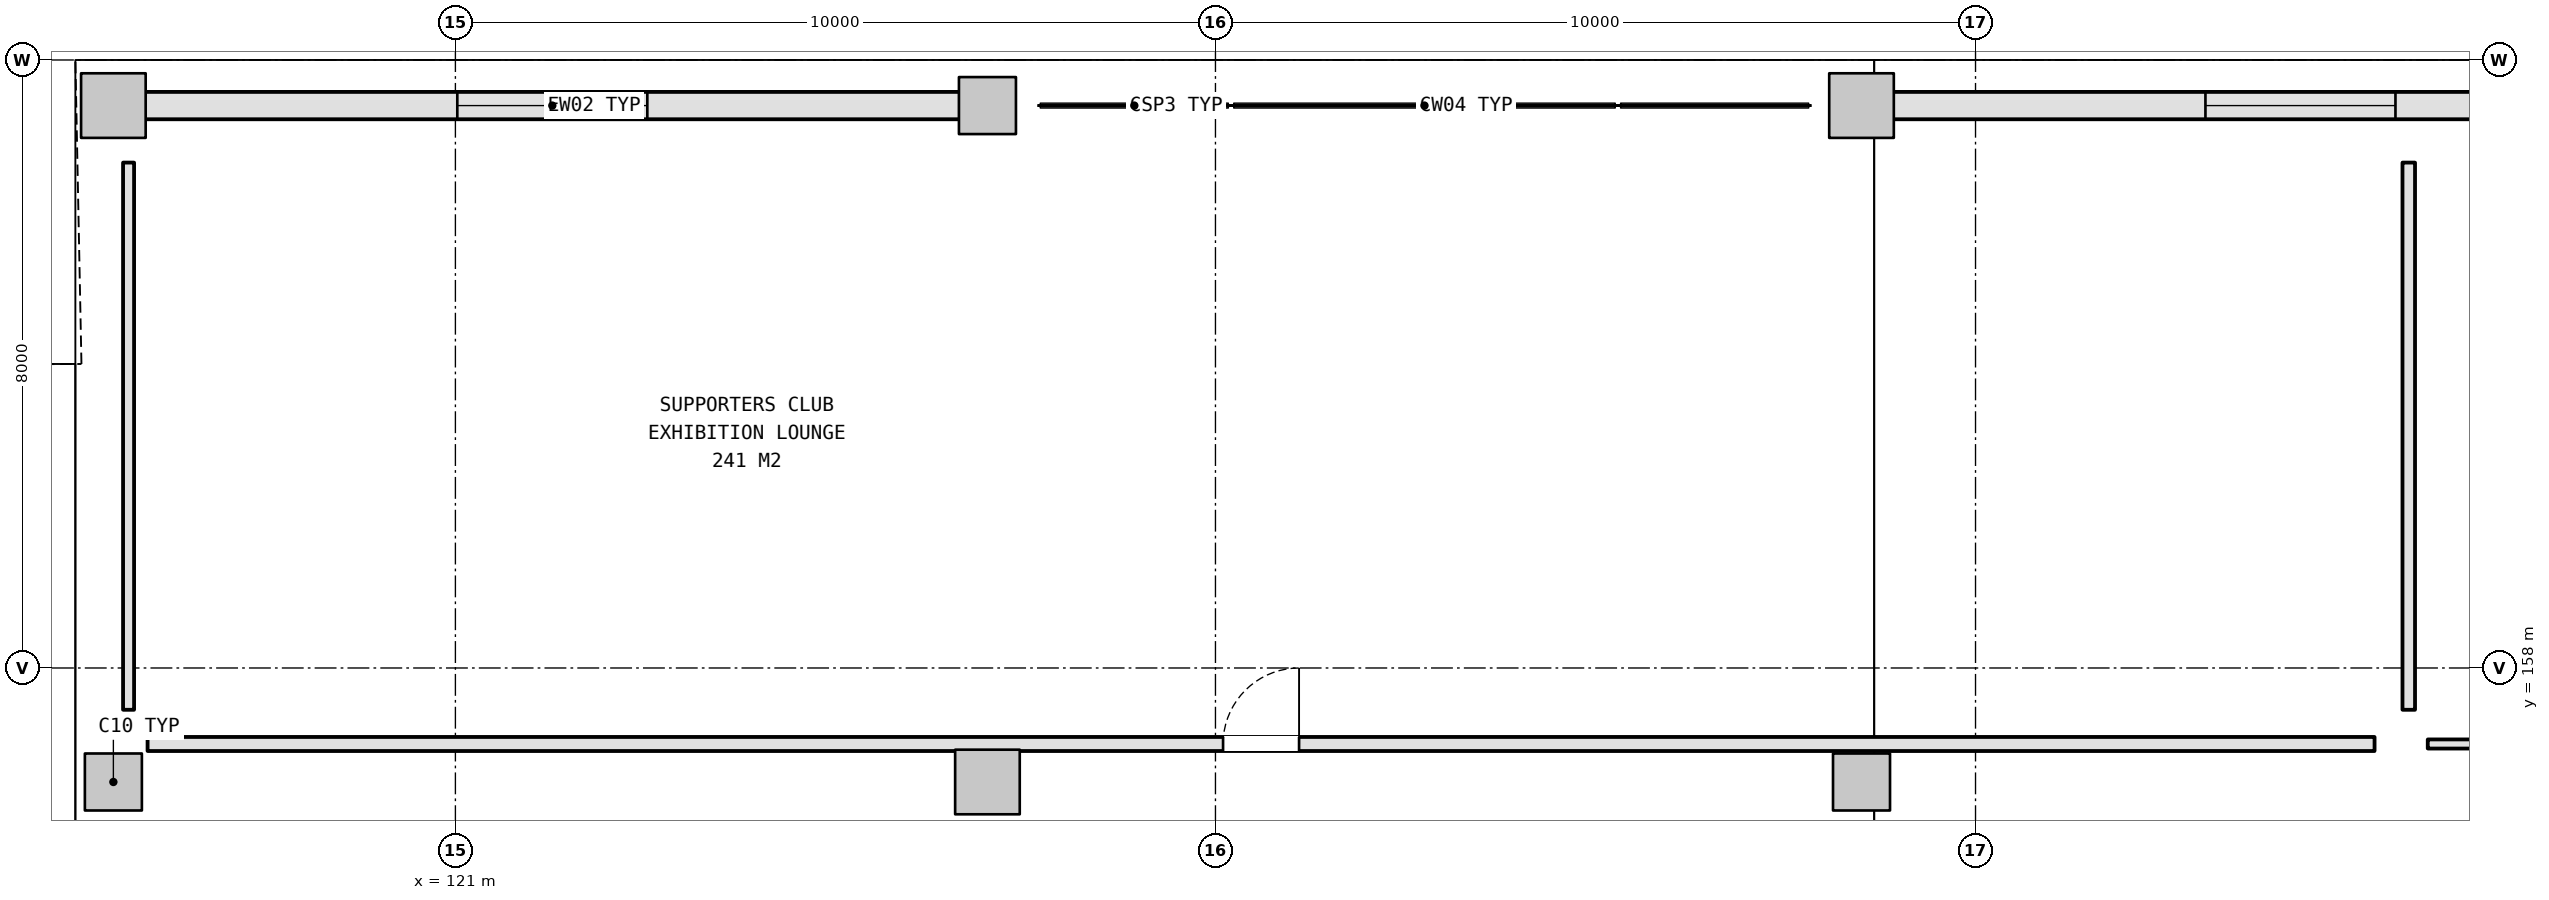
"""IFC4 building model, lengths in metres.
Left out: names, types, materials, properties, quantities, classifications, styles, units other than length and angle.
Written with IfcOpenShell. Run it as: python <this file> out.ifc"""

import sys

from ifc_helpers import new_model, si_unit, direction, frame, frame_2d, origin, origin_2d, place, context, subcontext, project, spatial, rectangle, extrude, element, fill, save


model = new_model("IFC4")
c1 = context("Model", 3, precision=1e-05, world=origin(), true_north=direction((0.0, 1.0)))
c2 = subcontext(c1, "Body", "Model", "MODEL_VIEW")
j1 = project(units=[si_unit("LENGTHUNIT", "METRE"), si_unit("PLANEANGLEUNIT", "RADIAN")], contexts=[c1])
p1 = place(None, origin())
s1 = spatial("IfcSite", under=j1, at=p1, CompositionType="ELEMENT")
p2 = place(p1, origin())
s2 = spatial("IfcBuilding", under=s1, at=p2, CompositionType="ELEMENT")
p3 = place(p2, frame((0.0, 0.0, 5.4)))
s3 = spatial("IfcBuildingStorey", under=s2, at=p3, CompositionType="ELEMENT", Elevation=5.4)
p4 = place(p3, frame((116.5, 156.5, 0.0), z_axis=(0.0, 0.0, 1.0), x_axis=(1.0, 0.0, 0.0)))
e1 = element("IfcColumn", 1, at=p4, inside=s3, PredefinedType="COLUMN", context=c2, shape_type="SweptSolid", body=[
    extrude(rectangle(XDim=0.75, YDim=0.75, at=origin_2d()), origin(), (0.0, 0.0, 1.0), 5.4),
])
for number, where, z_axis, x_axis in (
    (2, (116.5, 165.4, 0.0), (0.0, 0.0, 1.0), (1.0, 0.0, 0.0)),
    (3, (128.0, 156.5, 0.0), (0.0, 0.0, 1.0), (1.0, 0.0, 0.0)),
):
    element("IfcColumn", number, at=place(p3, frame(where, z_axis=z_axis, x_axis=x_axis)), inside=s3, PredefinedType="COLUMN", context=c2, shape_type="SweptSolid", body=[
        extrude(rectangle(XDim=0.85, YDim=0.85, at=origin_2d()), origin(), (0.0, 0.0, 1.0), 5.4),
    ])
for number, where, z_axis, x_axis in (
    (4, (128.0, 165.4, 0.0), (0.0, 0.0, 1.0), (1.0, 0.0, 0.0)),
    (5, (139.5, 156.5, 0.0), (0.0, 0.0, 1.0), (1.0, 0.0, 0.0)),
):
    element("IfcColumn", number, at=place(p3, frame(where, z_axis=z_axis, x_axis=x_axis)), inside=s3, PredefinedType="COLUMN", context=c2, shape_type="SweptSolid", body=[
        extrude(rectangle(XDim=0.75, YDim=0.75, at=origin_2d()), origin(), (0.0, 0.0, 1.0), 5.4),
    ])
p5 = place(p3, frame((139.5, 165.4, 0.0), z_axis=(0.0, 0.0, 1.0), x_axis=(1.0, 0.0, 0.0)))
e6 = element("IfcColumn", 6, at=p5, inside=s3, PredefinedType="COLUMN", context=c2, shape_type="SweptSolid", body=[
    extrude(rectangle(XDim=0.85, YDim=0.85, at=origin_2d()), origin(), (0.0, 0.0, 1.0), 5.4),
])
p6 = place(p3, frame((116.913, 165.4, 0.0), z_axis=(0.0, 0.0, 1.0), x_axis=(1.0, 0.0, 0.0)))
e7 = element("IfcWall", 7, at=p6, inside=s3, PredefinedType="SOLIDWALL", context=c2, shape_type="SweptSolid", body=[
    extrude(rectangle(XDim=10.724, YDim=0.36, at=frame_2d((5.362, 0.0))), origin(), (0.0, 0.0, 1.0), 4.475),
])
p7 = place(p6, frame((4.112, 0.0, 1.05)))
e8 = element("IfcOpeningElement", 8, at=p7, cuts=e7, PredefinedType="OPENING", context=c2, shape_type="SweptSolid", body=[
    extrude(rectangle(XDim=2.5, YDim=2.0, at=frame_2d((1.25, 1.0))), frame((0.0, 0.19, 0.0), z_axis=(0.0, -1.0, 0.0), x_axis=(1.0, 0.0, 0.0)), (0.0, 0.0, 1.0), 0.38),
])
p8 = place(p3, frame((139.913, 165.4, 0.0), z_axis=(0.0, 0.0, 1.0), x_axis=(1.0, 0.0, 0.0)))
e9 = element("IfcWall", 9, at=p8, inside=s3, PredefinedType="SOLIDWALL", context=c2, shape_type="SweptSolid", body=[
    extrude(rectangle(XDim=10.724, YDim=0.36, at=frame_2d((5.362, 0.0))), origin(), (0.0, 0.0, 1.0), 4.475),
])
p9 = place(p8, frame((4.112, 0.0, 1.05)))
e10 = element("IfcOpeningElement", 10, at=p9, cuts=e9, PredefinedType="OPENING", context=c2, shape_type="SweptSolid", body=[
    extrude(rectangle(XDim=2.5, YDim=2.0, at=frame_2d((1.25, 1.0))), frame((0.0, 0.19, 0.0), z_axis=(0.0, -1.0, 0.0), x_axis=(1.0, 0.0, 0.0)), (0.0, 0.0, 1.0), 0.38),
])
p10 = place(p3, frame((146.25, 157.0, 0.0), z_axis=(0.0, 0.0, 1.0), x_axis=(-1.0, 0.0, 0.0)))
e11 = element("IfcWall", 11, at=p10, inside=s3, PredefinedType="PARTITIONING", context=c2, shape_type="SweptSolid", body=[
    extrude(rectangle(XDim=29.3, YDim=0.185, at=frame_2d((14.65, 0.0))), origin(), (0.0, 0.0, 1.0), 4.525),
])
p11 = place(p10, frame((14.15, 0.0, 0.0)))
e12 = element("IfcOpeningElement", 12, at=p11, cuts=e11, PredefinedType="OPENING", context=c2, shape_type="SweptSolid", body=[
    extrude(rectangle(XDim=1.0, YDim=2.15, at=frame_2d((0.5, 1.075))), frame((0.0, 0.103, 0.0), z_axis=(0.0, -1.0, 0.0), x_axis=(1.0, 0.0, 0.0)), (0.0, 0.0, 1.0), 0.205),
])
p12 = place(p3, frame((116.7, 157.45, 0.0), z_axis=(0.0, 0.0, 1.0), x_axis=(0.0, 1.0, 0.0)))
e13 = element("IfcWall", 13, at=p12, inside=s3, PredefinedType="PARTITIONING", context=c2, shape_type="SweptSolid", body=[
    extrude(rectangle(XDim=7.2, YDim=0.145, at=frame_2d((3.6, 0.0))), origin(), (0.0, 0.0, 1.0), 4.475),
])
p13 = place(p3, frame((166.25, 157.0, 0.0), z_axis=(0.0, 0.0, 1.0), x_axis=(-1.0, 0.0, 0.0)))
e14 = element("IfcWall", 14, at=p13, inside=s3, PredefinedType="PARTITIONING", context=c2, shape_type="SweptSolid", body=[
    extrude(rectangle(XDim=19.3, YDim=0.12, at=frame_2d((9.65, 0.0))), origin(), (0.0, 0.0, 1.0), 4.525),
])
p14 = place(p13, frame((9.11, 0.0, 0.0)))
e15 = element("IfcOpeningElement", 15, at=p14, cuts=e14, PredefinedType="OPENING", context=c2, shape_type="SweptSolid", body=[
    extrude(rectangle(XDim=1.08, YDim=2.25, at=frame_2d((0.54, 1.125))), frame((0.0, 0.07, 0.0), z_axis=(0.0, -1.0, 0.0), x_axis=(1.0, 0.0, 0.0)), (0.0, 0.0, 1.0), 0.14),
])
p15 = place(p3, frame((146.7, 157.45, 0.0), z_axis=(0.0, 0.0, 1.0), x_axis=(0.0, 1.0, 0.0)))
e16 = element("IfcWall", 16, at=p15, inside=s3, PredefinedType="PARTITIONING", context=c2, shape_type="SweptSolid", body=[
    extrude(rectangle(XDim=7.2, YDim=0.165, at=frame_2d((3.6, 0.0))), origin(), (0.0, 0.0, 1.0), 4.675),
])
p16 = place(p7, origin())
e17 = element("IfcWindow", 17, at=p16, inside=s3, PartitioningType="SINGLE_PANEL", PredefinedType="WINDOW", context=c2, shape_type="SweptSolid", body=[
    extrude(rectangle(XDim=2.5, YDim=2.0, at=frame_2d((1.25, 1.0))), frame((0.0, 0.03, 0.0), z_axis=(0.0, -1.0, 0.0), x_axis=(1.0, 0.0, 0.0)), (0.0, 0.0, 1.0), 0.06),
])
fill(e8, e17)
p17 = place(p9, origin())
e18 = element("IfcWindow", 18, at=p17, inside=s3, PartitioningType="SINGLE_PANEL", PredefinedType="WINDOW", context=c2, shape_type="SweptSolid", body=[
    extrude(rectangle(XDim=2.5, YDim=2.0, at=frame_2d((1.25, 1.0))), frame((0.0, 0.03, 0.0), z_axis=(0.0, -1.0, 0.0), x_axis=(1.0, 0.0, 0.0)), (0.0, 0.0, 1.0), 0.06),
])
fill(e10, e18)
p18 = place(p11, frame((1.0, 0.0, 0.0), z_axis=(0.0, 0.0, 1.0), x_axis=(-1.0, 0.0, 0.0)))
e19 = element("IfcDoor", 19, at=p18, inside=s3, OperationType="SINGLE_SWING_LEFT", PredefinedType="DOOR", context=c2, shape_type="SweptSolid", body=[
    extrude(rectangle(XDim=1.0, YDim=2.15, at=frame_2d((0.5, 1.075))), frame((0.0, 0.025, 0.0), z_axis=(0.0, -1.0, 0.0), x_axis=(1.0, 0.0, 0.0)), (0.0, 0.0, 1.0), 0.05),
])
fill(e12, e19)
save(model, sys.argv[1])
